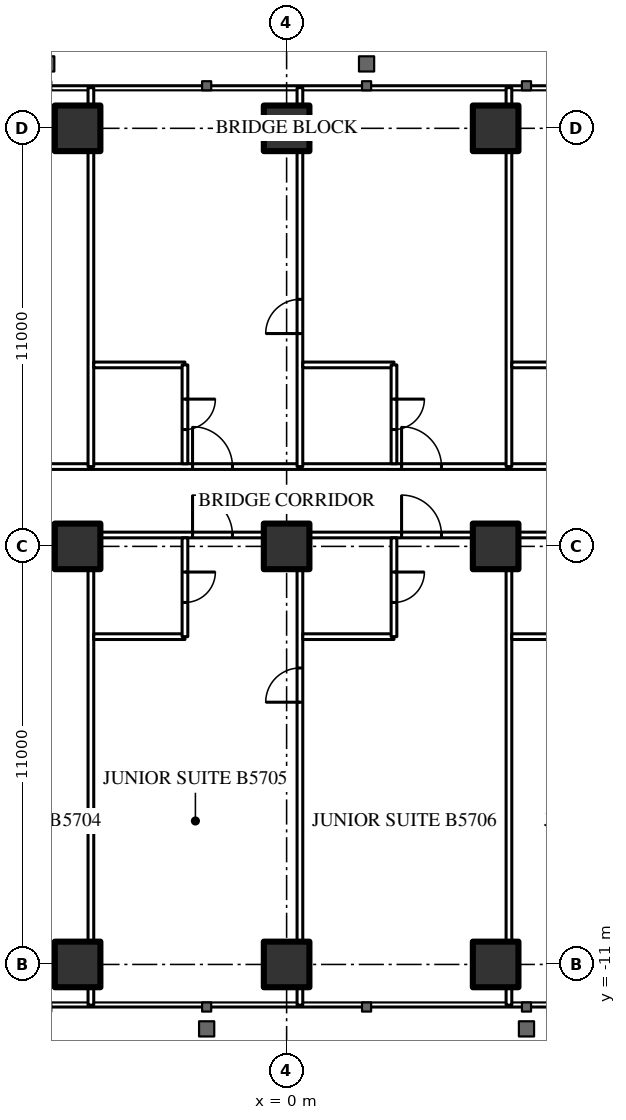
"""IFC4 building model, lengths in metres.
Left out: names, types, materials, properties, quantities, classifications, styles, units other than length and angle.
Written with IfcOpenShell. Run it as: python <this file> out.ifc"""

import sys

from ifc_helpers import new_model, si_unit, direction, frame, frame_2d, origin, origin_2d, place, context, subcontext, project, spatial, rectangle, hollow_rectangle, extrude, element, fill, save


model = new_model("IFC4")
c1 = context("Model", 3, precision=1e-05, world=origin(), true_north=direction((0.0, 1.0)))
c2 = subcontext(c1, "Body", "Model", "MODEL_VIEW")
j1 = project(units=[si_unit("LENGTHUNIT", "METRE"), si_unit("PLANEANGLEUNIT", "RADIAN")], contexts=[c1])
p1 = place(None, origin())
s1 = spatial("IfcSite", under=j1, at=p1, CompositionType="ELEMENT")
p2 = place(p1, origin())
s2 = spatial("IfcBuilding", under=s1, at=p2, CompositionType="ELEMENT")
p3 = place(p2, frame((0.0, 0.0, 215.3)))
s3 = spatial("IfcBuildingStorey", under=s2, at=p3, CompositionType="ELEMENT", Elevation=215.3)
for number, where, z_axis, x_axis in (
    (1, (-5.5, -11.0, 0.0), (0.0, 0.0, 1.0), (1.0, 0.0, 0.0)),
    (2, (0.0, -11.0, 0.0), (0.0, 0.0, 1.0), (1.0, 0.0, 0.0)),
    (3, (5.5, -11.0, 0.0), (0.0, 0.0, 1.0), (1.0, 0.0, 0.0)),
    (4, (-5.5, 0.0, 0.0), (0.0, 0.0, 1.0), (1.0, 0.0, 0.0)),
    (5, (0.0, 0.0, 0.0), (0.0, 0.0, 1.0), (1.0, 0.0, 0.0)),
    (6, (5.5, 0.0, 0.0), (0.0, 0.0, 1.0), (1.0, 0.0, 0.0)),
    (7, (-5.5, 11.0, 0.0), (0.0, 0.0, 1.0), (1.0, 0.0, 0.0)),
    (8, (0.0, 11.0, 0.0), (0.0, 0.0, 1.0), (1.0, 0.0, 0.0)),
    (9, (5.5, 11.0, 0.0), (0.0, 0.0, 1.0), (1.0, 0.0, 0.0)),
):
    element("IfcColumn", number, at=place(p3, frame(where, z_axis=z_axis, x_axis=x_axis)), inside=s3, PredefinedType="COLUMN", context=c2, shape_type="SweptSolid", body=[
        extrude(hollow_rectangle(XDim=1.2, YDim=1.2, WallThickness=0.12, at=origin_2d()), origin(), (0.0, 0.0, 1.0), 3.6),
    ])
p4 = place(p3, frame((-27.5, 0.3, 0.0), z_axis=(0.0, 0.0, 1.0), x_axis=(1.0, 0.0, 0.0)))
e10 = element("IfcWall", 10, at=p4, inside=s3, PredefinedType="PARTITIONING", context=c2, shape_type="SweptSolid", body=[
    extrude(rectangle(XDim=55.0, YDim=0.15, at=frame_2d((27.5, 0.0))), origin(), (0.0, 0.0, 1.0), 2.4),
])
p5 = place(p4, frame((1.575, 0.0, 0.0)))
e11 = element("IfcOpeningElement", 11, at=p5, cuts=e10, PredefinedType="OPENING", context=c2, shape_type="SweptSolid", body=[
    extrude(rectangle(XDim=1.0, YDim=2.2, at=frame_2d((0.5, 1.1))), frame((0.0, 0.085, 0.0), z_axis=(0.0, -1.0, 0.0), x_axis=(1.0, 0.0, 0.0)), (0.0, 0.0, 1.0), 0.17),
])
p6 = place(p4, frame((8.525, 0.0, 0.0)))
e12 = element("IfcOpeningElement", 12, at=p6, cuts=e10, PredefinedType="OPENING", context=c2, shape_type="SweptSolid", body=[
    extrude(rectangle(XDim=1.05, YDim=2.4, at=frame_2d((0.525, 1.2))), frame((0.0, 0.085, 0.0), z_axis=(0.0, -1.0, 0.0), x_axis=(1.0, 0.0, 0.0)), (0.0, 0.0, 1.0), 0.17),
])
p7 = place(p4, frame((14.025, 0.0, 0.0)))
e13 = element("IfcOpeningElement", 13, at=p7, cuts=e10, PredefinedType="OPENING", context=c2, shape_type="SweptSolid", body=[
    extrude(rectangle(XDim=1.05, YDim=2.4, at=frame_2d((0.525, 1.2))), frame((0.0, 0.085, 0.0), z_axis=(0.0, -1.0, 0.0), x_axis=(1.0, 0.0, 0.0)), (0.0, 0.0, 1.0), 0.17),
])
p8 = place(p4, frame((19.525, 0.0, 0.0)))
e14 = element("IfcOpeningElement", 14, at=p8, cuts=e10, PredefinedType="OPENING", context=c2, shape_type="SweptSolid", body=[
    extrude(rectangle(XDim=1.05, YDim=2.4, at=frame_2d((0.525, 1.2))), frame((0.0, 0.085, 0.0), z_axis=(0.0, -1.0, 0.0), x_axis=(1.0, 0.0, 0.0)), (0.0, 0.0, 1.0), 0.17),
])
p9 = place(p4, frame((25.025, 0.0, 0.0)))
e15 = element("IfcOpeningElement", 15, at=p9, cuts=e10, PredefinedType="OPENING", context=c2, shape_type="SweptSolid", body=[
    extrude(rectangle(XDim=1.05, YDim=2.4, at=frame_2d((0.525, 1.2))), frame((0.0, 0.085, 0.0), z_axis=(0.0, -1.0, 0.0), x_axis=(1.0, 0.0, 0.0)), (0.0, 0.0, 1.0), 0.17),
])
p10 = place(p4, frame((30.525, 0.0, 0.0)))
e16 = element("IfcOpeningElement", 16, at=p10, cuts=e10, PredefinedType="OPENING", context=c2, shape_type="SweptSolid", body=[
    extrude(rectangle(XDim=1.05, YDim=2.4, at=frame_2d((0.525, 1.2))), frame((0.0, 0.085, 0.0), z_axis=(0.0, -1.0, 0.0), x_axis=(1.0, 0.0, 0.0)), (0.0, 0.0, 1.0), 0.17),
])
p11 = place(p4, frame((36.025, 0.0, 0.0)))
e17 = element("IfcOpeningElement", 17, at=p11, cuts=e10, PredefinedType="OPENING", context=c2, shape_type="SweptSolid", body=[
    extrude(rectangle(XDim=1.05, YDim=2.4, at=frame_2d((0.525, 1.2))), frame((0.0, 0.085, 0.0), z_axis=(0.0, -1.0, 0.0), x_axis=(1.0, 0.0, 0.0)), (0.0, 0.0, 1.0), 0.17),
])
p12 = place(p4, frame((41.525, 0.0, 0.0)))
e18 = element("IfcOpeningElement", 18, at=p12, cuts=e10, PredefinedType="OPENING", context=c2, shape_type="SweptSolid", body=[
    extrude(rectangle(XDim=1.05, YDim=2.4, at=frame_2d((0.525, 1.2))), frame((0.0, 0.085, 0.0), z_axis=(0.0, -1.0, 0.0), x_axis=(1.0, 0.0, 0.0)), (0.0, 0.0, 1.0), 0.17),
])
p13 = place(p4, frame((47.025, 0.0, 0.0)))
e19 = element("IfcOpeningElement", 19, at=p13, cuts=e10, PredefinedType="OPENING", context=c2, shape_type="SweptSolid", body=[
    extrude(rectangle(XDim=1.05, YDim=2.4, at=frame_2d((0.525, 1.2))), frame((0.0, 0.085, 0.0), z_axis=(0.0, -1.0, 0.0), x_axis=(1.0, 0.0, 0.0)), (0.0, 0.0, 1.0), 0.17),
])
p14 = place(p4, frame((52.525, 0.0, 0.0)))
e20 = element("IfcOpeningElement", 20, at=p14, cuts=e10, PredefinedType="OPENING", context=c2, shape_type="SweptSolid", body=[
    extrude(rectangle(XDim=1.05, YDim=2.4, at=frame_2d((0.525, 1.2))), frame((0.0, 0.085, 0.0), z_axis=(0.0, -1.0, 0.0), x_axis=(1.0, 0.0, 0.0)), (0.0, 0.0, 1.0), 0.17),
])
p15 = place(p3, frame((-27.5, 2.1, 0.0), z_axis=(0.0, 0.0, 1.0), x_axis=(1.0, 0.0, 0.0)))
e21 = element("IfcWall", 21, at=p15, inside=s3, PredefinedType="PARTITIONING", context=c2, shape_type="SweptSolid", body=[
    extrude(rectangle(XDim=55.0, YDim=0.15, at=frame_2d((27.5, 0.0))), origin(), (0.0, 0.0, 1.0), 3.4),
])
p16 = place(p15, frame((2.025, 0.0, 0.0)))
e22 = element("IfcOpeningElement", 22, at=p16, cuts=e21, PredefinedType="OPENING", context=c2, shape_type="SweptSolid", body=[
    extrude(rectangle(XDim=1.05, YDim=2.4, at=frame_2d((0.525, 1.2))), frame((0.0, 0.085, 0.0), z_axis=(0.0, -1.0, 0.0), x_axis=(1.0, 0.0, 0.0)), (0.0, 0.0, 1.0), 0.17),
])
p17 = place(p15, frame((8.525, 0.0, 0.0)))
e23 = element("IfcOpeningElement", 23, at=p17, cuts=e21, PredefinedType="OPENING", context=c2, shape_type="SweptSolid", body=[
    extrude(rectangle(XDim=1.05, YDim=2.4, at=frame_2d((0.525, 1.2))), frame((0.0, 0.085, 0.0), z_axis=(0.0, -1.0, 0.0), x_axis=(1.0, 0.0, 0.0)), (0.0, 0.0, 1.0), 0.17),
])
p18 = place(p15, frame((14.025, 0.0, 0.0)))
e24 = element("IfcOpeningElement", 24, at=p18, cuts=e21, PredefinedType="OPENING", context=c2, shape_type="SweptSolid", body=[
    extrude(rectangle(XDim=1.05, YDim=2.4, at=frame_2d((0.525, 1.2))), frame((0.0, 0.085, 0.0), z_axis=(0.0, -1.0, 0.0), x_axis=(1.0, 0.0, 0.0)), (0.0, 0.0, 1.0), 0.17),
])
p19 = place(p15, frame((19.525, 0.0, 0.0)))
e25 = element("IfcOpeningElement", 25, at=p19, cuts=e21, PredefinedType="OPENING", context=c2, shape_type="SweptSolid", body=[
    extrude(rectangle(XDim=1.05, YDim=2.4, at=frame_2d((0.525, 1.2))), frame((0.0, 0.085, 0.0), z_axis=(0.0, -1.0, 0.0), x_axis=(1.0, 0.0, 0.0)), (0.0, 0.0, 1.0), 0.17),
])
p20 = place(p15, frame((25.025, 0.0, 0.0)))
e26 = element("IfcOpeningElement", 26, at=p20, cuts=e21, PredefinedType="OPENING", context=c2, shape_type="SweptSolid", body=[
    extrude(rectangle(XDim=1.05, YDim=2.4, at=frame_2d((0.525, 1.2))), frame((0.0, 0.085, 0.0), z_axis=(0.0, -1.0, 0.0), x_axis=(1.0, 0.0, 0.0)), (0.0, 0.0, 1.0), 0.17),
])
p21 = place(p15, frame((30.525, 0.0, 0.0)))
e27 = element("IfcOpeningElement", 27, at=p21, cuts=e21, PredefinedType="OPENING", context=c2, shape_type="SweptSolid", body=[
    extrude(rectangle(XDim=1.05, YDim=2.4, at=frame_2d((0.525, 1.2))), frame((0.0, 0.085, 0.0), z_axis=(0.0, -1.0, 0.0), x_axis=(1.0, 0.0, 0.0)), (0.0, 0.0, 1.0), 0.17),
])
p22 = place(p15, frame((36.025, 0.0, 0.0)))
e28 = element("IfcOpeningElement", 28, at=p22, cuts=e21, PredefinedType="OPENING", context=c2, shape_type="SweptSolid", body=[
    extrude(rectangle(XDim=1.05, YDim=2.4, at=frame_2d((0.525, 1.2))), frame((0.0, 0.085, 0.0), z_axis=(0.0, -1.0, 0.0), x_axis=(1.0, 0.0, 0.0)), (0.0, 0.0, 1.0), 0.17),
])
p23 = place(p15, frame((41.525, 0.0, 0.0)))
e29 = element("IfcOpeningElement", 29, at=p23, cuts=e21, PredefinedType="OPENING", context=c2, shape_type="SweptSolid", body=[
    extrude(rectangle(XDim=1.05, YDim=2.4, at=frame_2d((0.525, 1.2))), frame((0.0, 0.085, 0.0), z_axis=(0.0, -1.0, 0.0), x_axis=(1.0, 0.0, 0.0)), (0.0, 0.0, 1.0), 0.17),
])
p24 = place(p15, frame((47.025, 0.0, 0.0)))
e30 = element("IfcOpeningElement", 30, at=p24, cuts=e21, PredefinedType="OPENING", context=c2, shape_type="SweptSolid", body=[
    extrude(rectangle(XDim=1.05, YDim=2.4, at=frame_2d((0.525, 1.2))), frame((0.0, 0.085, 0.0), z_axis=(0.0, -1.0, 0.0), x_axis=(1.0, 0.0, 0.0)), (0.0, 0.0, 1.0), 0.17),
])
p25 = place(p15, frame((52.525, 0.0, 0.0)))
e31 = element("IfcOpeningElement", 31, at=p25, cuts=e21, PredefinedType="OPENING", context=c2, shape_type="SweptSolid", body=[
    extrude(rectangle(XDim=1.05, YDim=2.4, at=frame_2d((0.525, 1.2))), frame((0.0, 0.085, 0.0), z_axis=(0.0, -1.0, 0.0), x_axis=(1.0, 0.0, 0.0)), (0.0, 0.0, 1.0), 0.17),
])
p26 = place(p3, frame((-5.15, -12.07, 0.0), z_axis=(0.0, 0.0, 1.0), x_axis=(0.0, 1.0, 0.0)))
e32 = element("IfcWall", 32, at=p26, inside=s3, PredefinedType="PARTITIONING", context=c2, shape_type="SweptSolid", body=[
    extrude(rectangle(XDim=12.37, YDim=0.15, at=frame_2d((6.185, 0.0))), origin(), (0.0, 0.0, 1.0), 3.4),
])
p27 = place(p3, frame((0.35, -12.07, 0.0), z_axis=(0.0, 0.0, 1.0), x_axis=(0.0, 1.0, 0.0)))
e33 = element("IfcWall", 33, at=p27, inside=s3, PredefinedType="PARTITIONING", context=c2, shape_type="SweptSolid", body=[
    extrude(rectangle(XDim=12.37, YDim=0.15, at=frame_2d((6.185, 0.0))), origin(), (0.0, 0.0, 1.0), 3.4),
])
p28 = place(p27, frame((7.97, 0.0, 0.0)))
e34 = element("IfcOpeningElement", 34, at=p28, cuts=e33, PredefinedType="OPENING", context=c2, shape_type="SweptSolid", body=[
    extrude(rectangle(XDim=0.9, YDim=2.2, at=frame_2d((0.45, 1.1))), frame((0.0, 0.085, 0.0), z_axis=(0.0, -1.0, 0.0), x_axis=(1.0, 0.0, 0.0)), (0.0, 0.0, 1.0), 0.17),
])
p29 = place(p3, frame((5.85, -12.07, 0.0), z_axis=(0.0, 0.0, 1.0), x_axis=(0.0, 1.0, 0.0)))
e35 = element("IfcWall", 35, at=p29, inside=s3, PredefinedType="PARTITIONING", context=c2, shape_type="SweptSolid", body=[
    extrude(rectangle(XDim=12.37, YDim=0.15, at=frame_2d((6.185, 0.0))), origin(), (0.0, 0.0, 1.0), 3.4),
])
p30 = place(p3, frame((-5.075, -2.375, 0.0), z_axis=(0.0, 0.0, 1.0), x_axis=(1.0, 0.0, 0.0)))
e36 = element("IfcWall", 36, at=p30, inside=s3, PredefinedType="PARTITIONING", context=c2, shape_type="SweptSolid", body=[
    extrude(rectangle(XDim=2.4, YDim=0.15, at=frame_2d((1.2, 0.0))), origin(), (0.0, 0.0, 1.0), 3.4),
])
p31 = place(p3, frame((-2.675, -2.375, 0.0), z_axis=(0.0, 0.0, 1.0), x_axis=(0.0, 1.0, 0.0)))
e37 = element("IfcWall", 37, at=p31, inside=s3, PredefinedType="PARTITIONING", context=c2, shape_type="SweptSolid", body=[
    extrude(rectangle(XDim=2.6, YDim=0.15, at=frame_2d((1.3, 0.0))), origin(), (0.0, 0.0, 1.0), 3.4),
])
p32 = place(p31, frame((0.9, 0.0, 0.0)))
e38 = element("IfcOpeningElement", 38, at=p32, cuts=e37, PredefinedType="OPENING", context=c2, shape_type="SweptSolid", body=[
    extrude(rectangle(XDim=0.8, YDim=2.2, at=frame_2d((0.4, 1.1))), frame((0.0, 0.085, 0.0), z_axis=(0.0, -1.0, 0.0), x_axis=(1.0, 0.0, 0.0)), (0.0, 0.0, 1.0), 0.17),
])
p33 = place(p3, frame((0.425, -2.375, 0.0), z_axis=(0.0, 0.0, 1.0), x_axis=(1.0, 0.0, 0.0)))
e39 = element("IfcWall", 39, at=p33, inside=s3, PredefinedType="PARTITIONING", context=c2, shape_type="SweptSolid", body=[
    extrude(rectangle(XDim=2.4, YDim=0.15, at=frame_2d((1.2, 0.0))), origin(), (0.0, 0.0, 1.0), 3.4),
])
p34 = place(p3, frame((2.825, -2.375, 0.0), z_axis=(0.0, 0.0, 1.0), x_axis=(0.0, 1.0, 0.0)))
e40 = element("IfcWall", 40, at=p34, inside=s3, PredefinedType="PARTITIONING", context=c2, shape_type="SweptSolid", body=[
    extrude(rectangle(XDim=2.6, YDim=0.15, at=frame_2d((1.3, 0.0))), origin(), (0.0, 0.0, 1.0), 3.4),
])
p35 = place(p34, frame((0.9, 0.0, 0.0)))
e41 = element("IfcOpeningElement", 41, at=p35, cuts=e40, PredefinedType="OPENING", context=c2, shape_type="SweptSolid", body=[
    extrude(rectangle(XDim=0.8, YDim=2.2, at=frame_2d((0.4, 1.1))), frame((0.0, 0.085, 0.0), z_axis=(0.0, -1.0, 0.0), x_axis=(1.0, 0.0, 0.0)), (0.0, 0.0, 1.0), 0.17),
])
p36 = place(p3, frame((5.925, -2.375, 0.0), z_axis=(0.0, 0.0, 1.0), x_axis=(1.0, 0.0, 0.0)))
e42 = element("IfcWall", 42, at=p36, inside=s3, PredefinedType="PARTITIONING", context=c2, shape_type="SweptSolid", body=[
    extrude(rectangle(XDim=2.4, YDim=0.15, at=frame_2d((1.2, 0.0))), origin(), (0.0, 0.0, 1.0), 3.4),
])
p37 = place(p3, frame((-5.15, 2.1, 0.0), z_axis=(0.0, 0.0, 1.0), x_axis=(0.0, 1.0, 0.0)))
e43 = element("IfcWall", 43, at=p37, inside=s3, PredefinedType="PARTITIONING", context=c2, shape_type="SweptSolid", body=[
    extrude(rectangle(XDim=9.97, YDim=0.15, at=frame_2d((4.985, 0.0))), origin(), (0.0, 0.0, 1.0), 3.4),
])
p38 = place(p3, frame((0.35, 2.1, 0.0), z_axis=(0.0, 0.0, 1.0), x_axis=(0.0, 1.0, 0.0)))
e44 = element("IfcWall", 44, at=p38, inside=s3, PredefinedType="PARTITIONING", context=c2, shape_type="SweptSolid", body=[
    extrude(rectangle(XDim=9.97, YDim=0.15, at=frame_2d((4.985, 0.0))), origin(), (0.0, 0.0, 1.0), 3.4),
])
p39 = place(p38, frame((3.5, 0.0, 0.0)))
e45 = element("IfcOpeningElement", 45, at=p39, cuts=e44, PredefinedType="OPENING", context=c2, shape_type="SweptSolid", body=[
    extrude(rectangle(XDim=0.9, YDim=2.2, at=frame_2d((0.45, 1.1))), frame((0.0, 0.085, 0.0), z_axis=(0.0, -1.0, 0.0), x_axis=(1.0, 0.0, 0.0)), (0.0, 0.0, 1.0), 0.17),
])
p40 = place(p3, frame((5.85, 2.1, 0.0), z_axis=(0.0, 0.0, 1.0), x_axis=(0.0, 1.0, 0.0)))
e46 = element("IfcWall", 46, at=p40, inside=s3, PredefinedType="PARTITIONING", context=c2, shape_type="SweptSolid", body=[
    extrude(rectangle(XDim=9.97, YDim=0.15, at=frame_2d((4.985, 0.0))), origin(), (0.0, 0.0, 1.0), 3.4),
])
p41 = place(p3, frame((-5.075, 4.775, 0.0), z_axis=(0.0, 0.0, 1.0), x_axis=(1.0, 0.0, 0.0)))
e47 = element("IfcWall", 47, at=p41, inside=s3, PredefinedType="PARTITIONING", context=c2, shape_type="SweptSolid", body=[
    extrude(rectangle(XDim=2.4, YDim=0.15, at=frame_2d((1.2, 0.0))), origin(), (0.0, 0.0, 1.0), 3.4),
])
p42 = place(p3, frame((-2.675, 2.175, 0.0), z_axis=(0.0, 0.0, 1.0), x_axis=(0.0, 1.0, 0.0)))
e48 = element("IfcWall", 48, at=p42, inside=s3, PredefinedType="PARTITIONING", context=c2, shape_type="SweptSolid", body=[
    extrude(rectangle(XDim=2.6, YDim=0.15, at=frame_2d((1.3, 0.0))), origin(), (0.0, 0.0, 1.0), 3.4),
])
p43 = place(p42, frame((0.9, 0.0, 0.0)))
e49 = element("IfcOpeningElement", 49, at=p43, cuts=e48, PredefinedType="OPENING", context=c2, shape_type="SweptSolid", body=[
    extrude(rectangle(XDim=0.8, YDim=2.2, at=frame_2d((0.4, 1.1))), frame((0.0, 0.085, 0.0), z_axis=(0.0, -1.0, 0.0), x_axis=(1.0, 0.0, 0.0)), (0.0, 0.0, 1.0), 0.17),
])
p44 = place(p3, frame((0.425, 4.775, 0.0), z_axis=(0.0, 0.0, 1.0), x_axis=(1.0, 0.0, 0.0)))
e50 = element("IfcWall", 50, at=p44, inside=s3, PredefinedType="PARTITIONING", context=c2, shape_type="SweptSolid", body=[
    extrude(rectangle(XDim=2.4, YDim=0.15, at=frame_2d((1.2, 0.0))), origin(), (0.0, 0.0, 1.0), 3.4),
])
p45 = place(p3, frame((2.825, 2.175, 0.0), z_axis=(0.0, 0.0, 1.0), x_axis=(0.0, 1.0, 0.0)))
e51 = element("IfcWall", 51, at=p45, inside=s3, PredefinedType="PARTITIONING", context=c2, shape_type="SweptSolid", body=[
    extrude(rectangle(XDim=2.6, YDim=0.15, at=frame_2d((1.3, 0.0))), origin(), (0.0, 0.0, 1.0), 3.4),
])
p46 = place(p45, frame((0.9, 0.0, 0.0)))
e52 = element("IfcOpeningElement", 52, at=p46, cuts=e51, PredefinedType="OPENING", context=c2, shape_type="SweptSolid", body=[
    extrude(rectangle(XDim=0.8, YDim=2.2, at=frame_2d((0.4, 1.1))), frame((0.0, 0.085, 0.0), z_axis=(0.0, -1.0, 0.0), x_axis=(1.0, 0.0, 0.0)), (0.0, 0.0, 1.0), 0.17),
])
p47 = place(p3, frame((5.925, 4.775, 0.0), z_axis=(0.0, 0.0, 1.0), x_axis=(1.0, 0.0, 0.0)))
e53 = element("IfcWall", 53, at=p47, inside=s3, PredefinedType="PARTITIONING", context=c2, shape_type="SweptSolid", body=[
    extrude(rectangle(XDim=2.4, YDim=0.15, at=frame_2d((1.2, 0.0))), origin(), (0.0, 0.0, 1.0), 3.4),
])
p48 = place(p32, origin())
e54 = element("IfcDoor", 54, at=p48, inside=s3, OperationType="SINGLE_SWING_RIGHT", PredefinedType="DOOR", context=c2, shape_type="SweptSolid", body=[
    extrude(rectangle(XDim=0.8, YDim=2.2, at=frame_2d((0.4, 1.1))), frame((0.0, 0.025, 0.0), z_axis=(0.0, -1.0, 0.0), x_axis=(1.0, 0.0, 0.0)), (0.0, 0.0, 1.0), 0.05),
])
fill(e38, e54)
p49 = place(p9, origin())
e55 = element("IfcDoor", 55, at=p49, inside=s3, OperationType="SINGLE_SWING_LEFT", PredefinedType="DOOR", context=c2, shape_type="SweptSolid", body=[
    extrude(rectangle(XDim=1.05, YDim=2.4, at=frame_2d((0.525, 1.2))), frame((0.0, 0.025, 0.0), z_axis=(0.0, -1.0, 0.0), x_axis=(1.0, 0.0, 0.0)), (0.0, 0.0, 1.0), 0.05),
])
fill(e15, e55)
p50 = place(p35, origin())
e56 = element("IfcDoor", 56, at=p50, inside=s3, OperationType="SINGLE_SWING_RIGHT", PredefinedType="DOOR", context=c2, shape_type="SweptSolid", body=[
    extrude(rectangle(XDim=0.8, YDim=2.2, at=frame_2d((0.4, 1.1))), frame((0.0, 0.025, 0.0), z_axis=(0.0, -1.0, 0.0), x_axis=(1.0, 0.0, 0.0)), (0.0, 0.0, 1.0), 0.05),
])
fill(e41, e56)
p51 = place(p10, origin())
e57 = element("IfcDoor", 57, at=p51, inside=s3, OperationType="SINGLE_SWING_LEFT", PredefinedType="DOOR", context=c2, shape_type="SweptSolid", body=[
    extrude(rectangle(XDim=1.05, YDim=2.4, at=frame_2d((0.525, 1.2))), frame((0.0, 0.025, 0.0), z_axis=(0.0, -1.0, 0.0), x_axis=(1.0, 0.0, 0.0)), (0.0, 0.0, 1.0), 0.05),
])
fill(e16, e57)
p52 = place(p43, origin())
e58 = element("IfcDoor", 58, at=p52, inside=s3, OperationType="SINGLE_SWING_RIGHT", PredefinedType="DOOR", context=c2, shape_type="SweptSolid", body=[
    extrude(rectangle(XDim=0.8, YDim=2.2, at=frame_2d((0.4, 1.1))), frame((0.0, 0.025, 0.0), z_axis=(0.0, -1.0, 0.0), x_axis=(1.0, 0.0, 0.0)), (0.0, 0.0, 1.0), 0.05),
])
fill(e49, e58)
p53 = place(p20, origin())
e59 = element("IfcDoor", 59, at=p53, inside=s3, OperationType="SINGLE_SWING_LEFT", PredefinedType="DOOR", context=c2, shape_type="SweptSolid", body=[
    extrude(rectangle(XDim=1.05, YDim=2.4, at=frame_2d((0.525, 1.2))), frame((0.0, 0.025, 0.0), z_axis=(0.0, -1.0, 0.0), x_axis=(1.0, 0.0, 0.0)), (0.0, 0.0, 1.0), 0.05),
])
fill(e26, e59)
p54 = place(p46, origin())
e60 = element("IfcDoor", 60, at=p54, inside=s3, OperationType="SINGLE_SWING_RIGHT", PredefinedType="DOOR", context=c2, shape_type="SweptSolid", body=[
    extrude(rectangle(XDim=0.8, YDim=2.2, at=frame_2d((0.4, 1.1))), frame((0.0, 0.025, 0.0), z_axis=(0.0, -1.0, 0.0), x_axis=(1.0, 0.0, 0.0)), (0.0, 0.0, 1.0), 0.05),
])
fill(e52, e60)
p55 = place(p21, origin())
e61 = element("IfcDoor", 61, at=p55, inside=s3, OperationType="SINGLE_SWING_LEFT", PredefinedType="DOOR", context=c2, shape_type="SweptSolid", body=[
    extrude(rectangle(XDim=1.05, YDim=2.4, at=frame_2d((0.525, 1.2))), frame((0.0, 0.025, 0.0), z_axis=(0.0, -1.0, 0.0), x_axis=(1.0, 0.0, 0.0)), (0.0, 0.0, 1.0), 0.05),
])
fill(e27, e61)
p56 = place(p28, origin())
e62 = element("IfcDoor", 62, at=p56, inside=s3, OperationType="SINGLE_SWING_LEFT", PredefinedType="DOOR", context=c2, shape_type="SweptSolid", body=[
    extrude(rectangle(XDim=0.9, YDim=2.2, at=frame_2d((0.45, 1.1))), frame((0.0, 0.025, 0.0), z_axis=(0.0, -1.0, 0.0), x_axis=(1.0, 0.0, 0.0)), (0.0, 0.0, 1.0), 0.05),
])
fill(e34, e62)
p57 = place(p39, origin())
e63 = element("IfcDoor", 63, at=p57, inside=s3, OperationType="SINGLE_SWING_LEFT", PredefinedType="DOOR", context=c2, shape_type="SweptSolid", body=[
    extrude(rectangle(XDim=0.9, YDim=2.2, at=frame_2d((0.45, 1.1))), frame((0.0, 0.025, 0.0), z_axis=(0.0, -1.0, 0.0), x_axis=(1.0, 0.0, 0.0)), (0.0, 0.0, 1.0), 0.05),
])
fill(e45, e63)
save(model, sys.argv[1])
